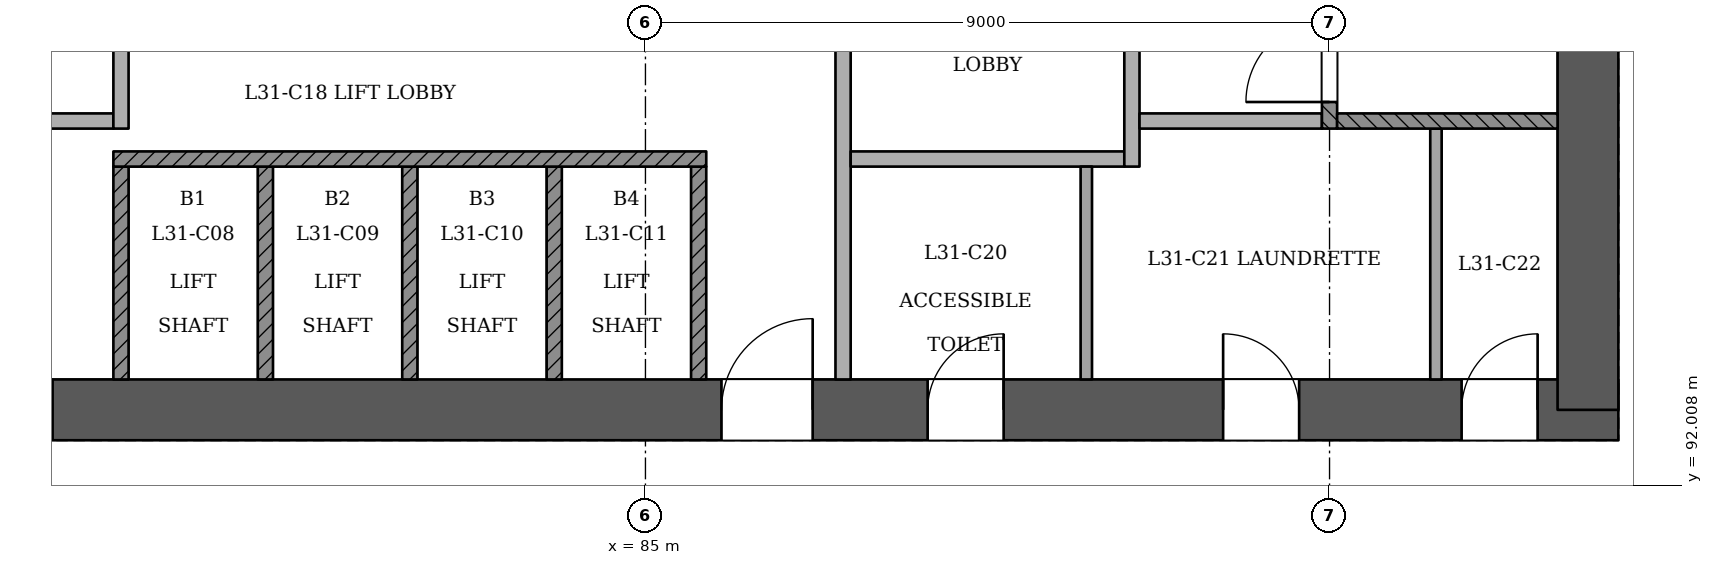
"""IFC4 building model, lengths in metres.
Left out: names, types, materials, properties, quantities, classifications, styles, units other than length and angle.
Written with IfcOpenShell. Run it as: python <this file> out.ifc"""

import sys

from ifc_helpers import new_model, si_unit, direction, frame, frame_2d, origin, place, context, subcontext, project, spatial, rectangle, extrude, element, fill, save


model = new_model("IFC4")
c1 = context("Model", 3, precision=1e-05, world=origin(), true_north=direction((0.0, 1.0)))
c2 = subcontext(c1, "Body", "Model", "MODEL_VIEW")
j1 = project(units=[si_unit("LENGTHUNIT", "METRE"), si_unit("PLANEANGLEUNIT", "RADIAN")], contexts=[c1])
p1 = place(None, origin())
s1 = spatial("IfcSite", under=j1, at=p1, CompositionType="ELEMENT")
p2 = place(p1, origin())
s2 = spatial("IfcBuilding", under=s1, at=p2, CompositionType="ELEMENT")
p3 = place(p2, frame((0.0, 0.0, 124.2)))
s3 = spatial("IfcBuildingStorey", under=s2, at=p3, CompositionType="ELEMENT", Elevation=124.2)
p4 = place(p3, frame((72.6, 93.0, 0.0), z_axis=(0.0, 0.0, 1.0), x_axis=(1.0, 0.0, 0.0)))
e1 = element("IfcWall", 1, at=p4, inside=s3, PredefinedType="SHEAR", context=c2, shape_type="SweptSolid", body=[
    extrude(rectangle(XDim=25.2, YDim=0.8, at=frame_2d((12.6, 0.0))), origin(), (0.0, 0.0, 1.0), 3.6),
])
p5 = place(p4, frame((1.2, 0.0, 0.0)))
e2 = element("IfcOpeningElement", 2, at=p5, cuts=e1, PredefinedType="OPENING", context=c2, shape_type="SweptSolid", body=[
    extrude(rectangle(XDim=1.2, YDim=2.1, at=frame_2d((0.6, 1.05))), frame((0.0, 0.411, 0.0), z_axis=(0.0, -1.0, 0.0), x_axis=(1.0, 0.0, 0.0)), (0.0, 0.0, 1.0), 0.821),
])
p6 = place(p4, frame((3.4, 0.0, 0.0)))
e3 = element("IfcOpeningElement", 3, at=p6, cuts=e1, PredefinedType="OPENING", context=c2, shape_type="SweptSolid", body=[
    extrude(rectangle(XDim=1.2, YDim=2.1, at=frame_2d((0.6, 1.05))), frame((0.0, 0.411, 0.0), z_axis=(0.0, -1.0, 0.0), x_axis=(1.0, 0.0, 0.0)), (0.0, 0.0, 1.0), 0.821),
])
p7 = place(p4, frame((13.4, 0.0, 0.0)))
e4 = element("IfcOpeningElement", 4, at=p7, cuts=e1, PredefinedType="OPENING", context=c2, shape_type="SweptSolid", body=[
    extrude(rectangle(XDim=1.2, YDim=2.1, at=frame_2d((0.6, 1.05))), frame((0.0, 0.411, 0.0), z_axis=(0.0, -1.0, 0.0), x_axis=(1.0, 0.0, 0.0)), (0.0, 0.0, 1.0), 0.821),
])
p8 = place(p4, frame((16.113, 0.0, 0.0)))
e5 = element("IfcOpeningElement", 5, at=p8, cuts=e1, PredefinedType="OPENING", context=c2, shape_type="SweptSolid", body=[
    extrude(rectangle(XDim=1.0, YDim=2.1, at=frame_2d((0.5, 1.05))), frame((0.0, 0.411, 0.0), z_axis=(0.0, -1.0, 0.0), x_axis=(1.0, 0.0, 0.0)), (0.0, 0.0, 1.0), 0.821),
])
p9 = place(p4, frame((20.0, 0.0, 0.0)))
e6 = element("IfcOpeningElement", 6, at=p9, cuts=e1, PredefinedType="OPENING", context=c2, shape_type="SweptSolid", body=[
    extrude(rectangle(XDim=1.0, YDim=2.1, at=frame_2d((0.5, 1.05))), frame((0.0, 0.411, 0.0), z_axis=(0.0, -1.0, 0.0), x_axis=(1.0, 0.0, 0.0)), (0.0, 0.0, 1.0), 0.821),
])
p10 = place(p4, frame((23.137, 0.0, 0.0)))
e7 = element("IfcOpeningElement", 7, at=p10, cuts=e1, PredefinedType="OPENING", context=c2, shape_type="SweptSolid", body=[
    extrude(rectangle(XDim=1.0, YDim=2.1, at=frame_2d((0.5, 1.05))), frame((0.0, 0.411, 0.0), z_axis=(0.0, -1.0, 0.0), x_axis=(1.0, 0.0, 0.0)), (0.0, 0.0, 1.0), 0.821),
])
p11 = place(p3, frame((97.4, 93.0, 0.0), z_axis=(0.0, 0.0, 1.0), x_axis=(0.0, 1.0, 0.0)))
e8 = element("IfcWall", 8, at=p11, inside=s3, PredefinedType="SHEAR", context=c2, shape_type="SweptSolid", body=[
    extrude(rectangle(XDim=11.2, YDim=0.8, at=frame_2d((5.6, 0.0))), origin(), (0.0, 0.0, 1.0), 3.6),
])
p12 = place(p3, frame((64.413, 98.139, 0.0), z_axis=(0.0, 0.0, 1.0), x_axis=(0.500003831119, -0.866023191876, 0.0)))
e9 = element("IfcWall", 9, at=p12, inside=s3, PredefinedType="PARTITIONING", context=c2, shape_type="SweptSolid", body=[
    extrude(rectangle(XDim=40.758, YDim=0.15, at=frame_2d((20.379, 0.0))), origin(), (0.0, 0.0, 1.0), 2.75),
])
p13 = place(p12, frame((0.2, 0.0, 0.0)))
e10 = element("IfcOpeningElement", 10, at=p13, cuts=e9, PredefinedType="OPENING", context=c2, shape_type="SweptSolid", body=[
    extrude(rectangle(XDim=1.2, YDim=2.1, at=frame_2d((0.6, 1.05))), frame((0.0, 0.085, 0.0), z_axis=(0.0, -1.0, 0.0), x_axis=(1.0, 0.0, 0.0)), (0.0, 0.0, 1.0), 0.171),
])
p14 = place(p12, frame((3.099, 0.0, 0.0)))
e11 = element("IfcOpeningElement", 11, at=p14, cuts=e9, PredefinedType="OPENING", context=c2, shape_type="SweptSolid", body=[
    extrude(rectangle(XDim=1.0, YDim=2.1, at=frame_2d((0.5, 1.05))), frame((0.0, 0.085, 0.0), z_axis=(0.0, -1.0, 0.0), x_axis=(1.0, 0.0, 0.0)), (0.0, 0.0, 1.0), 0.171),
])
p15 = place(p12, frame((9.774, 0.0, 0.0)))
e12 = element("IfcOpeningElement", 12, at=p15, cuts=e9, PredefinedType="OPENING", context=c2, shape_type="SweptSolid", body=[
    extrude(rectangle(XDim=1.0, YDim=2.1, at=frame_2d((0.5, 1.05))), frame((0.0, 0.085, 0.0), z_axis=(0.0, -1.0, 0.0), x_axis=(1.0, 0.0, 0.0)), (0.0, 0.0, 1.0), 0.171),
])
p16 = place(p12, frame((11.984, 0.0, 0.0)))
e13 = element("IfcOpeningElement", 13, at=p16, cuts=e9, PredefinedType="OPENING", context=c2, shape_type="SweptSolid", body=[
    extrude(rectangle(XDim=1.0, YDim=2.1, at=frame_2d((0.5, 1.05))), frame((0.0, 0.085, 0.0), z_axis=(0.0, -1.0, 0.0), x_axis=(1.0, 0.0, 0.0)), (0.0, 0.0, 1.0), 0.171),
])
p17 = place(p12, frame((18.659, 0.0, 0.0)))
e14 = element("IfcOpeningElement", 14, at=p17, cuts=e9, PredefinedType="OPENING", context=c2, shape_type="SweptSolid", body=[
    extrude(rectangle(XDim=1.0, YDim=2.1, at=frame_2d((0.5, 1.05))), frame((0.0, 0.085, 0.0), z_axis=(0.0, -1.0, 0.0), x_axis=(1.0, 0.0, 0.0)), (0.0, 0.0, 1.0), 0.171),
])
p18 = place(p12, frame((22.129, 0.0, 0.0)))
e15 = element("IfcOpeningElement", 15, at=p18, cuts=e9, PredefinedType="OPENING", context=c2, shape_type="SweptSolid", body=[
    extrude(rectangle(XDim=1.0, YDim=2.1, at=frame_2d((0.5, 1.05))), frame((0.0, 0.085, 0.0), z_axis=(0.0, -1.0, 0.0), x_axis=(1.0, 0.0, 0.0)), (0.0, 0.0, 1.0), 0.171),
])
p19 = place(p12, frame((27.659, 0.0, 0.0)))
e16 = element("IfcOpeningElement", 16, at=p19, cuts=e9, PredefinedType="OPENING", context=c2, shape_type="SweptSolid", body=[
    extrude(rectangle(XDim=1.0, YDim=2.1, at=frame_2d((0.5, 1.05))), frame((0.0, 0.085, 0.0), z_axis=(0.0, -1.0, 0.0), x_axis=(1.0, 0.0, 0.0)), (0.0, 0.0, 1.0), 0.171),
])
p20 = place(p12, frame((31.129, 0.0, 0.0)))
e17 = element("IfcOpeningElement", 17, at=p20, cuts=e9, PredefinedType="OPENING", context=c2, shape_type="SweptSolid", body=[
    extrude(rectangle(XDim=1.0, YDim=2.1, at=frame_2d((0.5, 1.05))), frame((0.0, 0.085, 0.0), z_axis=(0.0, -1.0, 0.0), x_axis=(1.0, 0.0, 0.0)), (0.0, 0.0, 1.0), 0.171),
])
p21 = place(p12, frame((36.659, 0.0, 0.0)))
e18 = element("IfcOpeningElement", 18, at=p21, cuts=e9, PredefinedType="OPENING", context=c2, shape_type="SweptSolid", body=[
    extrude(rectangle(XDim=1.0, YDim=2.1, at=frame_2d((0.5, 1.05))), frame((0.0, 0.085, 0.0), z_axis=(0.0, -1.0, 0.0), x_axis=(1.0, 0.0, 0.0)), (0.0, 0.0, 1.0), 0.171),
])
p22 = place(p12, frame((39.445, 0.0, 0.0)))
e19 = element("IfcOpeningElement", 19, at=p22, cuts=e9, PredefinedType="OPENING", context=c2, shape_type="SweptSolid", body=[
    extrude(rectangle(XDim=1.0, YDim=2.1, at=frame_2d((0.5, 1.05))), frame((0.0, 0.085, 0.0), z_axis=(0.0, -1.0, 0.0), x_axis=(1.0, 0.0, 0.0)), (0.0, 0.0, 1.0), 0.171),
])
p23 = place(p3, frame((85.208, 62.842, 0.0), z_axis=(0.0, 0.0, 1.0), x_axis=(0.499999338616, 0.866025785634, 0.0)))
e20 = element("IfcWall", 20, at=p23, inside=s3, PredefinedType="PARTITIONING", context=c2, shape_type="SweptSolid", body=[
    extrude(rectangle(XDim=40.758, YDim=0.15, at=frame_2d((20.379, 0.0))), origin(), (0.0, 0.0, 1.0), 2.75),
])
p24 = place(p23, frame((0.295, 0.0, 0.0)))
e21 = element("IfcOpeningElement", 21, at=p24, cuts=e20, PredefinedType="OPENING", context=c2, shape_type="SweptSolid", body=[
    extrude(rectangle(XDim=1.2, YDim=2.1, at=frame_2d((0.6, 1.05))), frame((0.0, 0.085, 0.0), z_axis=(0.0, -1.0, 0.0), x_axis=(1.0, 0.0, 0.0)), (0.0, 0.0, 1.0), 0.171),
])
p25 = place(p23, frame((4.129, 0.0, 0.0)))
e22 = element("IfcOpeningElement", 22, at=p25, cuts=e20, PredefinedType="OPENING", context=c2, shape_type="SweptSolid", body=[
    extrude(rectangle(XDim=1.0, YDim=2.1, at=frame_2d((0.5, 1.05))), frame((0.0, 0.085, 0.0), z_axis=(0.0, -1.0, 0.0), x_axis=(1.0, 0.0, 0.0)), (0.0, 0.0, 1.0), 0.171),
])
p26 = place(p23, frame((9.659, 0.0, 0.0)))
e23 = element("IfcOpeningElement", 23, at=p26, cuts=e20, PredefinedType="OPENING", context=c2, shape_type="SweptSolid", body=[
    extrude(rectangle(XDim=1.0, YDim=2.1, at=frame_2d((0.5, 1.05))), frame((0.0, 0.085, 0.0), z_axis=(0.0, -1.0, 0.0), x_axis=(1.0, 0.0, 0.0)), (0.0, 0.0, 1.0), 0.171),
])
p27 = place(p23, frame((11.984, 0.0, 0.0)))
e24 = element("IfcOpeningElement", 24, at=p27, cuts=e20, PredefinedType="OPENING", context=c2, shape_type="SweptSolid", body=[
    extrude(rectangle(XDim=1.0, YDim=2.1, at=frame_2d((0.5, 1.05))), frame((0.0, 0.085, 0.0), z_axis=(0.0, -1.0, 0.0), x_axis=(1.0, 0.0, 0.0)), (0.0, 0.0, 1.0), 0.171),
])
p28 = place(p23, frame((18.774, 0.0, 0.0)))
e25 = element("IfcOpeningElement", 25, at=p28, cuts=e20, PredefinedType="OPENING", context=c2, shape_type="SweptSolid", body=[
    extrude(rectangle(XDim=1.0, YDim=2.1, at=frame_2d((0.5, 1.05))), frame((0.0, 0.085, 0.0), z_axis=(0.0, -1.0, 0.0), x_axis=(1.0, 0.0, 0.0)), (0.0, 0.0, 1.0), 0.171),
])
p29 = place(p23, frame((21.099, 0.0, 0.0)))
e26 = element("IfcOpeningElement", 26, at=p29, cuts=e20, PredefinedType="OPENING", context=c2, shape_type="SweptSolid", body=[
    extrude(rectangle(XDim=1.0, YDim=2.1, at=frame_2d((0.5, 1.05))), frame((0.0, 0.085, 0.0), z_axis=(0.0, -1.0, 0.0), x_axis=(1.0, 0.0, 0.0)), (0.0, 0.0, 1.0), 0.171),
])
p30 = place(p23, frame((27.659, 0.0, 0.0)))
e27 = element("IfcOpeningElement", 27, at=p30, cuts=e20, PredefinedType="OPENING", context=c2, shape_type="SweptSolid", body=[
    extrude(rectangle(XDim=1.0, YDim=2.1, at=frame_2d((0.5, 1.05))), frame((0.0, 0.085, 0.0), z_axis=(0.0, -1.0, 0.0), x_axis=(1.0, 0.0, 0.0)), (0.0, 0.0, 1.0), 0.171),
])
p31 = place(p23, frame((30.099, 0.0, 0.0)))
e28 = element("IfcOpeningElement", 28, at=p31, cuts=e20, PredefinedType="OPENING", context=c2, shape_type="SweptSolid", body=[
    extrude(rectangle(XDim=1.0, YDim=2.1, at=frame_2d((0.5, 1.05))), frame((0.0, 0.085, 0.0), z_axis=(0.0, -1.0, 0.0), x_axis=(1.0, 0.0, 0.0)), (0.0, 0.0, 1.0), 0.171),
])
p32 = place(p23, frame((39.358, 0.0, 0.0)))
e29 = element("IfcOpeningElement", 29, at=p32, cuts=e20, PredefinedType="OPENING", context=c2, shape_type="SweptSolid", body=[
    extrude(rectangle(XDim=1.2, YDim=2.1, at=frame_2d((0.6, 1.05))), frame((0.0, 0.085, 0.0), z_axis=(0.0, -1.0, 0.0), x_axis=(1.0, 0.0, 0.0)), (0.0, 0.0, 1.0), 0.171),
])
for number, where, z_axis, x_axis in (
    (30, (78.1, 93.4, 0.0), (0.0, 0.0, 1.0), (0.0, 1.0, 0.0)),
    (31, (80.0, 93.4, 0.0), (0.0, 0.0, 1.0), (0.0, 1.0, 0.0)),
    (32, (81.9, 93.4, 0.0), (0.0, 0.0, 1.0), (0.0, 1.0, 0.0)),
    (33, (83.8, 93.4, 0.0), (0.0, 0.0, 1.0), (0.0, 1.0, 0.0)),
    (34, (85.7, 93.4, 0.0), (0.0, 0.0, 1.0), (0.0, 1.0, 0.0)),
):
    element("IfcWall", number, at=place(p3, frame(where, z_axis=z_axis, x_axis=x_axis)), inside=s3, PredefinedType="SOLIDWALL", context=c2, shape_type="SweptSolid", body=[
        extrude(rectangle(XDim=2.8, YDim=0.2, at=frame_2d((1.4, 0.0))), origin(), (0.0, 0.0, 1.0), 3.15),
    ])
p33 = place(p3, frame((87.6, 93.4, 0.0), z_axis=(0.0, 0.0, 1.0), x_axis=(0.0, 1.0, 0.0)))
e35 = element("IfcWall", 35, at=p33, inside=s3, PredefinedType="PARTITIONING", context=c2, shape_type="SweptSolid", body=[
    extrude(rectangle(XDim=7.0, YDim=0.2, at=frame_2d((3.5, 0.0))), origin(), (0.0, 0.0, 1.0), 3.15),
])
p34 = place(p33, frame((4.45, 0.0, 0.0)))
e36 = element("IfcOpeningElement", 36, at=p34, cuts=e35, PredefinedType="OPENING", context=c2, shape_type="SweptSolid", body=[
    extrude(rectangle(XDim=1.1, YDim=2.1, at=frame_2d((0.55, 1.05))), frame((0.0, 0.11, 0.0), z_axis=(0.0, -1.0, 0.0), x_axis=(1.0, 0.0, 0.0)), (0.0, 0.0, 1.0), 0.221),
])
p35 = place(p3, frame((90.8, 93.4, 0.0), z_axis=(0.0, 0.0, 1.0), x_axis=(0.0, 1.0, 0.0)))
e37 = element("IfcWall", 37, at=p35, inside=s3, PredefinedType="PARTITIONING", context=c2, shape_type="SweptSolid", body=[
    extrude(rectangle(XDim=2.8, YDim=0.15, at=frame_2d((1.4, 0.0))), origin(), (0.0, 0.0, 1.0), 3.15),
])
p36 = place(p3, frame((95.4, 93.4, 0.0), z_axis=(0.0, 0.0, 1.0), x_axis=(0.0, 1.0, 0.0)))
e38 = element("IfcWall", 38, at=p36, inside=s3, PredefinedType="PARTITIONING", context=c2, shape_type="SweptSolid", body=[
    extrude(rectangle(XDim=3.3, YDim=0.15, at=frame_2d((1.65, 0.0))), origin(), (0.0, 0.0, 1.0), 3.15),
])
p37 = place(p3, frame((78.0, 96.3, 0.0), z_axis=(0.0, 0.0, 1.0), x_axis=(1.0, 0.0, 0.0)))
e39 = element("IfcWall", 39, at=p37, inside=s3, PredefinedType="SOLIDWALL", context=c2, shape_type="SweptSolid", body=[
    extrude(rectangle(XDim=7.8, YDim=0.2, at=frame_2d((3.9, 0.0))), origin(), (0.0, 0.0, 1.0), 3.15),
])
p38 = place(p3, frame((87.7, 96.3, 0.0), z_axis=(0.0, 0.0, 1.0), x_axis=(1.0, 0.0, 0.0)))
e40 = element("IfcWall", 40, at=p38, inside=s3, PredefinedType="PARTITIONING", context=c2, shape_type="SweptSolid", body=[
    extrude(rectangle(XDim=3.6, YDim=0.2, at=frame_2d((1.8, 0.0))), origin(), (0.0, 0.0, 1.0), 3.15),
])
p39 = place(p3, frame((91.4, 96.2, 0.0), z_axis=(0.0, 0.0, 1.0), x_axis=(0.0, 1.0, 0.0)))
e41 = element("IfcWall", 41, at=p39, inside=s3, PredefinedType="PARTITIONING", context=c2, shape_type="SweptSolid", body=[
    extrude(rectangle(XDim=4.2, YDim=0.2, at=frame_2d((2.1, 0.0))), origin(), (0.0, 0.0, 1.0), 3.15),
])
p40 = place(p39, frame((2.45, 0.0, 0.0)))
e42 = element("IfcOpeningElement", 42, at=p40, cuts=e41, PredefinedType="OPENING", context=c2, shape_type="SweptSolid", body=[
    extrude(rectangle(XDim=1.1, YDim=2.1, at=frame_2d((0.55, 1.05))), frame((0.0, 0.11, 0.0), z_axis=(0.0, -1.0, 0.0), x_axis=(1.0, 0.0, 0.0)), (0.0, 0.0, 1.0), 0.221),
])
p41 = place(p3, frame((76.1, 96.8, 0.0), z_axis=(0.0, 0.0, 1.0), x_axis=(1.0, 0.0, 0.0)))
e43 = element("IfcWall", 43, at=p41, inside=s3, PredefinedType="PARTITIONING", context=c2, shape_type="SweptSolid", body=[
    extrude(rectangle(XDim=1.9, YDim=0.2, at=frame_2d((0.95, 0.0))), origin(), (0.0, 0.0, 1.0), 3.15),
])
p42 = place(p3, frame((78.1, 96.7, 0.0), z_axis=(0.0, 0.0, 1.0), x_axis=(0.0, 1.0, 0.0)))
e44 = element("IfcWall", 44, at=p42, inside=s3, PredefinedType="PARTITIONING", context=c2, shape_type="SweptSolid", body=[
    extrude(rectangle(XDim=3.7, YDim=0.2, at=frame_2d((1.85, 0.0))), origin(), (0.0, 0.0, 1.0), 3.15),
])
p43 = place(p42, frame((1.95, 0.0, 0.0)))
e45 = element("IfcOpeningElement", 45, at=p43, cuts=e44, PredefinedType="OPENING", context=c2, shape_type="SweptSolid", body=[
    extrude(rectangle(XDim=1.1, YDim=2.1, at=frame_2d((0.55, 1.05))), frame((0.0, 0.11, 0.0), z_axis=(0.0, -1.0, 0.0), x_axis=(1.0, 0.0, 0.0)), (0.0, 0.0, 1.0), 0.221),
])
p44 = place(p3, frame((91.5, 96.8, 0.0), z_axis=(0.0, 0.0, 1.0), x_axis=(1.0, 0.0, 0.0)))
e46 = element("IfcWall", 46, at=p44, inside=s3, PredefinedType="PARTITIONING", context=c2, shape_type="SweptSolid", body=[
    extrude(rectangle(XDim=2.4, YDim=0.2, at=frame_2d((1.2, 0.0))), origin(), (0.0, 0.0, 1.0), 3.15),
])
p45 = place(p3, frame((94.0, 96.7, 0.0), z_axis=(0.0, 0.0, 1.0), x_axis=(0.0, 1.0, 0.0)))
e47 = element("IfcWall", 47, at=p45, inside=s3, PredefinedType="SOLIDWALL", context=c2, shape_type="SweptSolid", body=[
    extrude(rectangle(XDim=3.7, YDim=0.2, at=frame_2d((1.85, 0.0))), origin(), (0.0, 0.0, 1.0), 3.15),
])
p46 = place(p45, frame((0.35, 0.0, 0.0)))
e48 = element("IfcOpeningElement", 48, at=p46, cuts=e47, PredefinedType="OPENING", context=c2, shape_type="SweptSolid", body=[
    extrude(rectangle(XDim=1.1, YDim=2.1, at=frame_2d((0.55, 1.05))), frame((0.0, 0.11, 0.0), z_axis=(0.0, -1.0, 0.0), x_axis=(1.0, 0.0, 0.0)), (0.0, 0.0, 1.0), 0.221),
])
p47 = place(p3, frame((94.1, 96.8, 0.0), z_axis=(0.0, 0.0, 1.0), x_axis=(1.0, 0.0, 0.0)))
e49 = element("IfcWall", 49, at=p47, inside=s3, PredefinedType="SOLIDWALL", context=c2, shape_type="SweptSolid", body=[
    extrude(rectangle(XDim=2.9, YDim=0.2, at=frame_2d((1.45, 0.0))), origin(), (0.0, 0.0, 1.0), 3.15),
])
p48 = place(p46, origin())
e50 = element("IfcDoor", 50, at=p48, inside=s3, OperationType="SINGLE_SWING_LEFT", PredefinedType="NOTDEFINED", context=c2, shape_type="SweptSolid", body=[
    extrude(rectangle(XDim=1.1, YDim=2.1, at=frame_2d((0.55, 1.05))), frame((0.0, 0.025, 0.0), z_axis=(0.0, -1.0, 0.0), x_axis=(1.0, 0.0, 0.0)), (0.0, 0.0, 1.0), 0.05),
])
fill(e48, e50)
p49 = place(p6, origin())
e51 = element("IfcDoor", 51, at=p49, inside=s3, OperationType="SINGLE_SWING_LEFT", PredefinedType="NOTDEFINED", context=c2, shape_type="SweptSolid", body=[
    extrude(rectangle(XDim=1.2, YDim=2.1, at=frame_2d((0.6, 1.05))), frame((0.0, 0.025, 0.0), z_axis=(0.0, -1.0, 0.0), x_axis=(1.0, 0.0, 0.0)), (0.0, 0.0, 1.0), 0.05),
])
fill(e3, e51)
p50 = place(p7, origin())
e52 = element("IfcDoor", 52, at=p50, inside=s3, OperationType="SINGLE_SWING_RIGHT", PredefinedType="NOTDEFINED", context=c2, shape_type="SweptSolid", body=[
    extrude(rectangle(XDim=1.2, YDim=2.1, at=frame_2d((0.6, 1.05))), frame((0.0, 0.025, 0.0), z_axis=(0.0, -1.0, 0.0), x_axis=(1.0, 0.0, 0.0)), (0.0, 0.0, 1.0), 0.05),
])
fill(e4, e52)
p51 = place(p8, origin())
e53 = element("IfcDoor", 53, at=p51, inside=s3, OperationType="SINGLE_SWING_RIGHT", PredefinedType="NOTDEFINED", context=c2, shape_type="SweptSolid", body=[
    extrude(rectangle(XDim=1.0, YDim=2.1, at=frame_2d((0.5, 1.05))), frame((0.0, 0.025, 0.0), z_axis=(0.0, -1.0, 0.0), x_axis=(1.0, 0.0, 0.0)), (0.0, 0.0, 1.0), 0.05),
])
fill(e5, e53)
p52 = place(p9, origin())
e54 = element("IfcDoor", 54, at=p52, inside=s3, OperationType="SINGLE_SWING_LEFT", PredefinedType="NOTDEFINED", context=c2, shape_type="SweptSolid", body=[
    extrude(rectangle(XDim=1.0, YDim=2.1, at=frame_2d((0.5, 1.05))), frame((0.0, 0.025, 0.0), z_axis=(0.0, -1.0, 0.0), x_axis=(1.0, 0.0, 0.0)), (0.0, 0.0, 1.0), 0.05),
])
fill(e6, e54)
p53 = place(p10, origin())
e55 = element("IfcDoor", 55, at=p53, inside=s3, OperationType="SINGLE_SWING_RIGHT", PredefinedType="NOTDEFINED", context=c2, shape_type="SweptSolid", body=[
    extrude(rectangle(XDim=1.0, YDim=2.1, at=frame_2d((0.5, 1.05))), frame((0.0, 0.025, 0.0), z_axis=(0.0, -1.0, 0.0), x_axis=(1.0, 0.0, 0.0)), (0.0, 0.0, 1.0), 0.05),
])
fill(e7, e55)
save(model, sys.argv[1])
